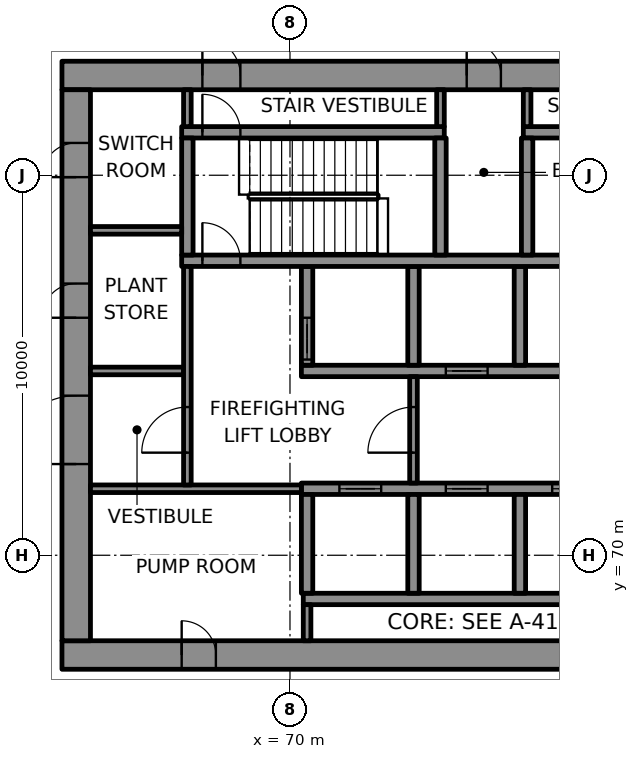
"""IFC4 building model, lengths in metres.
Left out: names, types, materials, properties, quantities, classifications, styles, units other than length and angle.
Written with IfcOpenShell. Run it as: python <this file> out.ifc"""

import sys

from ifc_helpers import new_model, si_unit, direction, frame, frame_2d, origin, place, context, subcontext, project, spatial, rectangle, extrude, element, fill, save


model = new_model("IFC4")
c1 = context("Model", 3, precision=1e-05, world=origin(), true_north=direction((0.0, 1.0)))
c2 = subcontext(c1, "Body", "Model", "MODEL_VIEW")
j1 = project(units=[si_unit("LENGTHUNIT", "METRE"), si_unit("PLANEANGLEUNIT", "RADIAN")], contexts=[c1])
p1 = place(None, origin())
s1 = spatial("IfcSite", under=j1, at=p1, CompositionType="ELEMENT")
p2 = place(p1, origin())
s2 = spatial("IfcBuilding", under=s1, at=p2, CompositionType="ELEMENT")
p3 = place(p2, frame((0.0, 0.0, 151.3)))
s3 = spatial("IfcBuildingStorey", under=s2, at=p3, CompositionType="ELEMENT", Elevation=151.3)
p4 = place(p3, frame((64.0, 67.375, 0.0), z_axis=(0.0, 0.0, 1.0), x_axis=(1.0, 0.0, 0.0)))
e1 = element("IfcWall", 1, at=p4, inside=s3, PredefinedType="SHEAR", context=c2, shape_type="SweptSolid", body=[
    extrude(rectangle(XDim=22.0, YDim=0.75, at=frame_2d((11.0, 0.0))), origin(), (0.0, 0.0, 1.0), 4.3),
])
p5 = place(p4, frame((3.15, 0.0, 0.0)))
e2 = element("IfcOpeningElement", 2, at=p5, cuts=e1, PredefinedType="OPENING", context=c2, shape_type="SweptSolid", body=[
    extrude(rectangle(XDim=0.9, YDim=2.1, at=frame_2d((0.45, 1.05))), frame((0.0, 0.385, 0.0), z_axis=(0.0, -1.0, 0.0), x_axis=(1.0, 0.0, 0.0)), (0.0, 0.0, 1.0), 0.77),
])
p6 = place(p3, frame((64.0, 82.625, 0.0), z_axis=(0.0, 0.0, 1.0), x_axis=(1.0, 0.0, 0.0)))
e3 = element("IfcWall", 3, at=p6, inside=s3, PredefinedType="SHEAR", context=c2, shape_type="SweptSolid", body=[
    extrude(rectangle(XDim=22.0, YDim=0.75, at=frame_2d((11.0, 0.0))), origin(), (0.0, 0.0, 1.0), 4.3),
])
p7 = place(p6, frame((3.695, 0.0, 0.0)))
e4 = element("IfcOpeningElement", 4, at=p7, cuts=e3, PredefinedType="OPENING", context=c2, shape_type="SweptSolid", body=[
    extrude(rectangle(XDim=1.0, YDim=2.1, at=frame_2d((0.5, 1.05))), frame((0.0, 0.385, 0.0), z_axis=(0.0, -1.0, 0.0), x_axis=(1.0, 0.0, 0.0)), (0.0, 0.0, 1.0), 0.77),
])
p8 = place(p6, frame((17.505, 0.0, 0.0)))
e5 = element("IfcOpeningElement", 5, at=p8, cuts=e3, PredefinedType="OPENING", context=c2, shape_type="SweptSolid", body=[
    extrude(rectangle(XDim=1.0, YDim=2.1, at=frame_2d((0.5, 1.05))), frame((0.0, 0.385, 0.0), z_axis=(0.0, -1.0, 0.0), x_axis=(1.0, 0.0, 0.0)), (0.0, 0.0, 1.0), 0.77),
])
p9 = place(p6, frame((10.65, 0.0, 0.0)))
e6 = element("IfcOpeningElement", 6, at=p9, cuts=e3, PredefinedType="OPENING", context=c2, shape_type="SweptSolid", body=[
    extrude(rectangle(XDim=0.9, YDim=2.1, at=frame_2d((0.45, 1.05))), frame((0.0, 0.385, 0.0), z_axis=(0.0, -1.0, 0.0), x_axis=(1.0, 0.0, 0.0)), (0.0, 0.0, 1.0), 0.77),
])
p10 = place(p3, frame((64.375, 67.75, 0.0), z_axis=(0.0, 0.0, 1.0), x_axis=(0.0, 1.0, 0.0)))
e7 = element("IfcWall", 7, at=p10, inside=s3, PredefinedType="SHEAR", context=c2, shape_type="SweptSolid", body=[
    extrude(rectangle(XDim=14.5, YDim=0.75, at=frame_2d((7.25, 0.0))), origin(), (0.0, 0.0, 1.0), 4.3),
])
p11 = place(p10, frame((4.65, 0.0, 0.0)))
e8 = element("IfcOpeningElement", 8, at=p11, cuts=e7, PredefinedType="OPENING", context=c2, shape_type="SweptSolid", body=[
    extrude(rectangle(XDim=1.8, YDim=2.1, at=frame_2d((0.9, 1.05))), frame((0.0, 0.385, 0.0), z_axis=(0.0, -1.0, 0.0), x_axis=(1.0, 0.0, 0.0)), (0.0, 0.0, 1.0), 0.77),
])
p12 = place(p10, frame((8.5, 0.0, 0.0)))
e9 = element("IfcOpeningElement", 9, at=p12, cuts=e7, PredefinedType="OPENING", context=c2, shape_type="SweptSolid", body=[
    extrude(rectangle(XDim=0.9, YDim=2.1, at=frame_2d((0.45, 1.05))), frame((0.0, 0.385, 0.0), z_axis=(0.0, -1.0, 0.0), x_axis=(1.0, 0.0, 0.0)), (0.0, 0.0, 1.0), 0.77),
])
p13 = place(p10, frame((12.2, 0.0, 0.0)))
e10 = element("IfcOpeningElement", 10, at=p13, cuts=e7, PredefinedType="OPENING", context=c2, shape_type="SweptSolid", body=[
    extrude(rectangle(XDim=0.9, YDim=2.1, at=frame_2d((0.45, 1.05))), frame((0.0, 0.385, 0.0), z_axis=(0.0, -1.0, 0.0), x_axis=(1.0, 0.0, 0.0)), (0.0, 0.0, 1.0), 0.77),
])
p14 = place(p3, frame((70.35, 68.85, 0.0), z_axis=(0.0, 0.0, 1.0), x_axis=(1.0, 0.0, 0.0)))
e11 = element("IfcWall", 11, at=p14, inside=s3, PredefinedType="SHEAR", context=c2, shape_type="SweptSolid", body=[
    extrude(rectangle(XDim=14.2, YDim=0.3, at=frame_2d((7.1, 0.0))), origin(), (0.0, 0.0, 1.0), 4.3),
])
p15 = place(p3, frame((70.3, 71.75, 0.0), z_axis=(0.0, 0.0, 1.0), x_axis=(1.0, 0.0, 0.0)))
e12 = element("IfcWall", 12, at=p15, inside=s3, PredefinedType="SHEAR", context=c2, shape_type="SweptSolid", body=[
    extrude(rectangle(XDim=14.3, YDim=0.3, at=frame_2d((7.15, 0.0))), origin(), (0.0, 0.0, 1.0), 4.3),
])
p16 = place(p15, frame((1.0, 0.0, 0.0)))
e13 = element("IfcOpeningElement", 13, at=p16, cuts=e12, PredefinedType="OPENING", context=c2, shape_type="SweptSolid", body=[
    extrude(rectangle(XDim=1.1, YDim=2.1, at=frame_2d((0.55, 1.05))), frame((0.0, 0.16, 0.0), z_axis=(0.0, -1.0, 0.0), x_axis=(1.0, 0.0, 0.0)), (0.0, 0.0, 1.0), 0.32),
])
p17 = place(p15, frame((3.8, 0.0, 0.0)))
e14 = element("IfcOpeningElement", 14, at=p17, cuts=e12, PredefinedType="OPENING", context=c2, shape_type="SweptSolid", body=[
    extrude(rectangle(XDim=1.1, YDim=2.1, at=frame_2d((0.55, 1.05))), frame((0.0, 0.16, 0.0), z_axis=(0.0, -1.0, 0.0), x_axis=(1.0, 0.0, 0.0)), (0.0, 0.0, 1.0), 0.32),
])
p18 = place(p15, frame((6.6, 0.0, 0.0)))
e15 = element("IfcOpeningElement", 15, at=p18, cuts=e12, PredefinedType="OPENING", context=c2, shape_type="SweptSolid", body=[
    extrude(rectangle(XDim=1.1, YDim=2.1, at=frame_2d((0.55, 1.05))), frame((0.0, 0.16, 0.0), z_axis=(0.0, -1.0, 0.0), x_axis=(1.0, 0.0, 0.0)), (0.0, 0.0, 1.0), 0.32),
])
p19 = place(p15, frame((9.4, 0.0, 0.0)))
e16 = element("IfcOpeningElement", 16, at=p19, cuts=e12, PredefinedType="OPENING", context=c2, shape_type="SweptSolid", body=[
    extrude(rectangle(XDim=1.1, YDim=2.1, at=frame_2d((0.55, 1.05))), frame((0.0, 0.16, 0.0), z_axis=(0.0, -1.0, 0.0), x_axis=(1.0, 0.0, 0.0)), (0.0, 0.0, 1.0), 0.32),
])
p20 = place(p15, frame((12.2, 0.0, 0.0)))
e17 = element("IfcOpeningElement", 17, at=p20, cuts=e12, PredefinedType="OPENING", context=c2, shape_type="SweptSolid", body=[
    extrude(rectangle(XDim=1.1, YDim=2.1, at=frame_2d((0.55, 1.05))), frame((0.0, 0.16, 0.0), z_axis=(0.0, -1.0, 0.0), x_axis=(1.0, 0.0, 0.0)), (0.0, 0.0, 1.0), 0.32),
])
p21 = place(p3, frame((70.3, 74.85, 0.0), z_axis=(0.0, 0.0, 1.0), x_axis=(1.0, 0.0, 0.0)))
e18 = element("IfcWall", 18, at=p21, inside=s3, PredefinedType="SHEAR", context=c2, shape_type="SweptSolid", body=[
    extrude(rectangle(XDim=14.3, YDim=0.3, at=frame_2d((7.15, 0.0))), origin(), (0.0, 0.0, 1.0), 4.3),
])
p22 = place(p21, frame((3.8, 0.0, 0.0)))
e19 = element("IfcOpeningElement", 19, at=p22, cuts=e18, PredefinedType="OPENING", context=c2, shape_type="SweptSolid", body=[
    extrude(rectangle(XDim=1.1, YDim=2.1, at=frame_2d((0.55, 1.05))), frame((0.0, 0.16, 0.0), z_axis=(0.0, -1.0, 0.0), x_axis=(1.0, 0.0, 0.0)), (0.0, 0.0, 1.0), 0.32),
])
p23 = place(p21, frame((12.2, 0.0, 0.0)))
e20 = element("IfcOpeningElement", 20, at=p23, cuts=e18, PredefinedType="OPENING", context=c2, shape_type="SweptSolid", body=[
    extrude(rectangle(XDim=1.1, YDim=2.1, at=frame_2d((0.55, 1.05))), frame((0.0, 0.16, 0.0), z_axis=(0.0, -1.0, 0.0), x_axis=(1.0, 0.0, 0.0)), (0.0, 0.0, 1.0), 0.32),
])
p24 = place(p3, frame((70.45, 69.0, 0.0), z_axis=(0.0, 0.0, 1.0), x_axis=(0.0, 1.0, 0.0)))
e21 = element("IfcWall", 21, at=p24, inside=s3, PredefinedType="SHEAR", context=c2, shape_type="SweptSolid", body=[
    extrude(rectangle(XDim=2.6, YDim=0.3, at=frame_2d((1.3, 0.0))), origin(), (0.0, 0.0, 1.0), 4.3),
])
p25 = place(p3, frame((70.45, 75.0, 0.0), z_axis=(0.0, 0.0, 1.0), x_axis=(0.0, 1.0, 0.0)))
e22 = element("IfcWall", 22, at=p25, inside=s3, PredefinedType="SHEAR", context=c2, shape_type="SweptSolid", body=[
    extrude(rectangle(XDim=2.6, YDim=0.3, at=frame_2d((1.3, 0.0))), origin(), (0.0, 0.0, 1.0), 4.3),
])
p26 = place(p25, frame((0.15, 0.0, 0.0)))
e23 = element("IfcOpeningElement", 23, at=p26, cuts=e22, PredefinedType="OPENING", context=c2, shape_type="SweptSolid", body=[
    extrude(rectangle(XDim=1.1, YDim=2.1, at=frame_2d((0.55, 1.05))), frame((0.0, 0.16, 0.0), z_axis=(0.0, -1.0, 0.0), x_axis=(1.0, 0.0, 0.0)), (0.0, 0.0, 1.0), 0.32),
])
for number, where, z_axis, x_axis in (
    (24, (73.25, 69.0, 0.0), (0.0, 0.0, 1.0), (0.0, 1.0, 0.0)),
    (25, (73.25, 75.0, 0.0), (0.0, 0.0, 1.0), (0.0, 1.0, 0.0)),
    (26, (76.05, 69.0, 0.0), (0.0, 0.0, 1.0), (0.0, 1.0, 0.0)),
    (27, (76.05, 75.0, 0.0), (0.0, 0.0, 1.0), (0.0, 1.0, 0.0)),
):
    element("IfcWall", number, at=place(p3, frame(where, z_axis=z_axis, x_axis=x_axis)), inside=s3, PredefinedType="SHEAR", context=c2, shape_type="SweptSolid", body=[
        extrude(rectangle(XDim=2.6, YDim=0.3, at=frame_2d((1.3, 0.0))), origin(), (0.0, 0.0, 1.0), 4.3),
    ])
p27 = place(p3, frame((67.15, 77.75, 0.0), z_axis=(0.0, 0.0, 1.0), x_axis=(1.0, 0.0, 0.0)))
e28 = element("IfcWall", 28, at=p27, inside=s3, PredefinedType="SHEAR", context=c2, shape_type="SweptSolid", body=[
    extrude(rectangle(XDim=17.45, YDim=0.3, at=frame_2d((8.725, 0.0))), origin(), (0.0, 0.0, 1.0), 4.3),
])
p28 = place(p27, frame((0.545, 0.0, 0.0)))
e29 = element("IfcOpeningElement", 29, at=p28, cuts=e28, PredefinedType="OPENING", context=c2, shape_type="SweptSolid", body=[
    extrude(rectangle(XDim=1.0, YDim=2.1, at=frame_2d((0.5, 1.05))), frame((0.0, 0.16, 0.0), z_axis=(0.0, -1.0, 0.0), x_axis=(1.0, 0.0, 0.0)), (0.0, 0.0, 1.0), 0.32),
])
p29 = place(p3, frame((67.15, 81.13, 0.0), z_axis=(0.0, 0.0, 1.0), x_axis=(1.0, 0.0, 0.0)))
e30 = element("IfcWall", 30, at=p29, inside=s3, PredefinedType="SHEAR", context=c2, shape_type="SweptSolid", body=[
    extrude(rectangle(XDim=6.91, YDim=0.3, at=frame_2d((3.455, 0.0))), origin(), (0.0, 0.0, 1.0), 4.3),
])
p30 = place(p29, frame((0.545, 0.0, 0.0)))
e31 = element("IfcOpeningElement", 31, at=p30, cuts=e30, PredefinedType="OPENING", context=c2, shape_type="SweptSolid", body=[
    extrude(rectangle(XDim=1.0, YDim=2.1, at=frame_2d((0.5, 1.05))), frame((0.0, 0.16, 0.0), z_axis=(0.0, -1.0, 0.0), x_axis=(1.0, 0.0, 0.0)), (0.0, 0.0, 1.0), 0.32),
])
p31 = place(p3, frame((76.14, 81.13, 0.0), z_axis=(0.0, 0.0, 1.0), x_axis=(1.0, 0.0, 0.0)))
e32 = element("IfcWall", 32, at=p31, inside=s3, PredefinedType="SHEAR", context=c2, shape_type="SweptSolid", body=[
    extrude(rectangle(XDim=6.86, YDim=0.3, at=frame_2d((3.43, 0.0))), origin(), (0.0, 0.0, 1.0), 4.3),
])
p32 = place(p31, frame((5.365, 0.0, 0.0)))
e33 = element("IfcOpeningElement", 33, at=p32, cuts=e32, PredefinedType="OPENING", context=c2, shape_type="SweptSolid", body=[
    extrude(rectangle(XDim=1.0, YDim=2.1, at=frame_2d((0.5, 1.05))), frame((0.0, 0.16, 0.0), z_axis=(0.0, -1.0, 0.0), x_axis=(1.0, 0.0, 0.0)), (0.0, 0.0, 1.0), 0.32),
])
for number, where, z_axis, x_axis in (
    (34, (67.3, 77.9, 0.0), (0.0, 0.0, 1.0), (0.0, 1.0, 0.0)),
    (35, (73.96, 77.9, 0.0), (0.0, 0.0, 1.0), (0.0, 1.0, 0.0)),
    (36, (76.24, 77.9, 0.0), (0.0, 0.0, 1.0), (0.0, 1.0, 0.0)),
):
    element("IfcWall", number, at=place(p3, frame(where, z_axis=z_axis, x_axis=x_axis)), inside=s3, PredefinedType="SHEAR", context=c2, shape_type="SweptSolid", body=[
        extrude(rectangle(XDim=3.08, YDim=0.3, at=frame_2d((1.54, 0.0))), origin(), (0.0, 0.0, 1.0), 4.3),
    ])
p33 = place(p3, frame((71.348, 108.836, 0.0), z_axis=(0.0, 0.0, 1.0), x_axis=(-0.500000750612, -0.866024970418, 0.0)))
e37 = element("IfcWall", 37, at=p33, inside=s3, PredefinedType="SOLIDWALL", context=c2, shape_type="SweptSolid", body=[
    extrude(rectangle(XDim=54.954, YDim=0.3, at=frame_2d((27.477, 0.0))), origin(), (0.0, 0.0, 1.0), 4.3),
])
p34 = place(p33, frame((2.96, 0.0, 0.8)))
e38 = element("IfcOpeningElement", 38, at=p34, cuts=e37, PredefinedType="OPENING", context=c2, shape_type="SweptSolid", body=[
    extrude(rectangle(XDim=3.0, YDim=2.4, at=frame_2d((1.5, 1.2))), frame((0.0, 0.16, 0.0), z_axis=(0.0, -1.0, 0.0), x_axis=(1.0, 0.0, 0.0)), (0.0, 0.0, 1.0), 0.32),
])
p35 = place(p33, frame((48.994, 0.0, 0.8)))
e39 = element("IfcOpeningElement", 39, at=p35, cuts=e37, PredefinedType="OPENING", context=c2, shape_type="SweptSolid", body=[
    extrude(rectangle(XDim=3.0, YDim=2.4, at=frame_2d((1.5, 1.2))), frame((0.0, 0.16, 0.0), z_axis=(0.0, -1.0, 0.0), x_axis=(1.0, 0.0, 0.0)), (0.0, 0.0, 1.0), 0.32),
])
p36 = place(p3, frame((64.75, 71.75, 0.0), z_axis=(0.0, 0.0, 1.0), x_axis=(1.0, 0.0, 0.0)))
e40 = element("IfcWall", 40, at=p36, inside=s3, PredefinedType="PARTITIONING", context=c2, shape_type="SweptSolid", body=[
    extrude(rectangle(XDim=5.55, YDim=0.2, at=frame_2d((2.775, 0.0))), origin(), (0.0, 0.0, 1.0), 4.3),
])
p37 = place(p3, frame((64.75, 74.85, 0.0), z_axis=(0.0, 0.0, 1.0), x_axis=(1.0, 0.0, 0.0)))
e41 = element("IfcWall", 41, at=p37, inside=s3, PredefinedType="PARTITIONING", context=c2, shape_type="SweptSolid", body=[
    extrude(rectangle(XDim=2.45, YDim=0.2, at=frame_2d((1.225, 0.0))), origin(), (0.0, 0.0, 1.0), 4.3),
])
p38 = place(p3, frame((64.75, 78.55, 0.0), z_axis=(0.0, 0.0, 1.0), x_axis=(1.0, 0.0, 0.0)))
e42 = element("IfcWall", 42, at=p38, inside=s3, PredefinedType="PARTITIONING", context=c2, shape_type="SweptSolid", body=[
    extrude(rectangle(XDim=2.4, YDim=0.2, at=frame_2d((1.2, 0.0))), origin(), (0.0, 0.0, 1.0), 4.3),
])
p39 = place(p3, frame((67.3, 71.85, 0.0), z_axis=(0.0, 0.0, 1.0), x_axis=(0.0, 1.0, 0.0)))
e43 = element("IfcWall", 43, at=p39, inside=s3, PredefinedType="PARTITIONING", context=c2, shape_type="SweptSolid", body=[
    extrude(rectangle(XDim=5.75, YDim=0.2, at=frame_2d((2.875, 0.0))), origin(), (0.0, 0.0, 1.0), 4.3),
])
p40 = place(p39, frame((0.85, 0.0, 0.0)))
e44 = element("IfcOpeningElement", 44, at=p40, cuts=e43, PredefinedType="OPENING", context=c2, shape_type="SweptSolid", body=[
    extrude(rectangle(XDim=1.2, YDim=2.1, at=frame_2d((0.6, 1.05))), frame((0.0, 0.11, 0.0), z_axis=(0.0, -1.0, 0.0), x_axis=(1.0, 0.0, 0.0)), (0.0, 0.0, 1.0), 0.22),
])
p41 = place(p3, frame((67.3, 81.28, 0.0), z_axis=(0.0, 0.0, 1.0), x_axis=(0.0, 1.0, 0.0)))
e45 = element("IfcWall", 45, at=p41, inside=s3, PredefinedType="PARTITIONING", context=c2, shape_type="SweptSolid", body=[
    extrude(rectangle(XDim=0.97, YDim=0.2, at=frame_2d((0.485, 0.0))), origin(), (0.0, 0.0, 1.0), 4.3),
])
p42 = place(p3, frame((70.45, 67.75, 0.0), z_axis=(0.0, 0.0, 1.0), x_axis=(0.0, 1.0, 0.0)))
e46 = element("IfcWall", 46, at=p42, inside=s3, PredefinedType="PARTITIONING", context=c2, shape_type="SweptSolid", body=[
    extrude(rectangle(XDim=0.95, YDim=0.2, at=frame_2d((0.475, 0.0))), origin(), (0.0, 0.0, 1.0), 4.3),
])
p43 = place(p3, frame((73.25, 71.9, 0.0), z_axis=(0.0, 0.0, 1.0), x_axis=(0.0, 1.0, 0.0)))
e47 = element("IfcWall", 47, at=p43, inside=s3, PredefinedType="PARTITIONING", context=c2, shape_type="SweptSolid", body=[
    extrude(rectangle(XDim=2.8, YDim=0.2, at=frame_2d((1.4, 0.0))), origin(), (0.0, 0.0, 1.0), 4.3),
])
p44 = place(p43, frame((0.8, 0.0, 0.0)))
e48 = element("IfcOpeningElement", 48, at=p44, cuts=e47, PredefinedType="OPENING", context=c2, shape_type="SweptSolid", body=[
    extrude(rectangle(XDim=1.2, YDim=2.1, at=frame_2d((0.6, 1.05))), frame((0.0, 0.11, 0.0), z_axis=(0.0, -1.0, 0.0), x_axis=(1.0, 0.0, 0.0)), (0.0, 0.0, 1.0), 0.22),
])
for number, where, z_axis, x_axis in (
    (49, (73.96, 81.28, 0.0), (0.0, 0.0, 1.0), (0.0, 1.0, 0.0)),
    (50, (76.24, 81.28, 0.0), (0.0, 0.0, 1.0), (0.0, 1.0, 0.0)),
):
    element("IfcWall", number, at=place(p3, frame(where, z_axis=z_axis, x_axis=x_axis)), inside=s3, PredefinedType="PARTITIONING", context=c2, shape_type="SweptSolid", body=[
        extrude(rectangle(XDim=0.97, YDim=0.2, at=frame_2d((0.485, 0.0))), origin(), (0.0, 0.0, 1.0), 4.3),
    ])
p45 = place(p16, origin())
e51 = element("IfcDoor", 51, at=p45, inside=s3, OperationType="DOUBLE_DOOR_SLIDING", PredefinedType="DOOR", context=c2, shape_type="SweptSolid", body=[
    extrude(rectangle(XDim=1.1, YDim=2.1, at=frame_2d((0.55, 1.05))), frame((0.0, 0.025, 0.0), z_axis=(0.0, -1.0, 0.0), x_axis=(1.0, 0.0, 0.0)), (0.0, 0.0, 1.0), 0.05),
])
fill(e13, e51)
p46 = place(p17, origin())
e52 = element("IfcDoor", 52, at=p46, inside=s3, OperationType="DOUBLE_DOOR_SLIDING", PredefinedType="DOOR", context=c2, shape_type="SweptSolid", body=[
    extrude(rectangle(XDim=1.1, YDim=2.1, at=frame_2d((0.55, 1.05))), frame((0.0, 0.025, 0.0), z_axis=(0.0, -1.0, 0.0), x_axis=(1.0, 0.0, 0.0)), (0.0, 0.0, 1.0), 0.05),
])
fill(e14, e52)
p47 = place(p18, origin())
e53 = element("IfcDoor", 53, at=p47, inside=s3, OperationType="DOUBLE_DOOR_SLIDING", PredefinedType="DOOR", context=c2, shape_type="SweptSolid", body=[
    extrude(rectangle(XDim=1.1, YDim=2.1, at=frame_2d((0.55, 1.05))), frame((0.0, 0.025, 0.0), z_axis=(0.0, -1.0, 0.0), x_axis=(1.0, 0.0, 0.0)), (0.0, 0.0, 1.0), 0.05),
])
fill(e15, e53)
p48 = place(p26, origin())
e54 = element("IfcDoor", 54, at=p48, inside=s3, OperationType="DOUBLE_DOOR_SLIDING", PredefinedType="DOOR", context=c2, shape_type="SweptSolid", body=[
    extrude(rectangle(XDim=1.1, YDim=2.1, at=frame_2d((0.55, 1.05))), frame((0.0, 0.025, 0.0), z_axis=(0.0, -1.0, 0.0), x_axis=(1.0, 0.0, 0.0)), (0.0, 0.0, 1.0), 0.05),
])
fill(e23, e54)
p49 = place(p22, origin())
e55 = element("IfcDoor", 55, at=p49, inside=s3, OperationType="DOUBLE_DOOR_SLIDING", PredefinedType="DOOR", context=c2, shape_type="SweptSolid", body=[
    extrude(rectangle(XDim=1.1, YDim=2.1, at=frame_2d((0.55, 1.05))), frame((0.0, 0.025, 0.0), z_axis=(0.0, -1.0, 0.0), x_axis=(1.0, 0.0, 0.0)), (0.0, 0.0, 1.0), 0.05),
])
fill(e19, e55)
p50 = place(p28, origin())
e56 = element("IfcDoor", 56, at=p50, inside=s3, OperationType="SINGLE_SWING_LEFT", PredefinedType="DOOR", context=c2, shape_type="SweptSolid", body=[
    extrude(rectangle(XDim=1.0, YDim=2.1, at=frame_2d((0.5, 1.05))), frame((0.0, 0.025, 0.0), z_axis=(0.0, -1.0, 0.0), x_axis=(1.0, 0.0, 0.0)), (0.0, 0.0, 1.0), 0.05),
])
fill(e29, e56)
p51 = place(p30, origin())
e57 = element("IfcDoor", 57, at=p51, inside=s3, OperationType="SINGLE_SWING_RIGHT", PredefinedType="DOOR", context=c2, shape_type="SweptSolid", body=[
    extrude(rectangle(XDim=1.0, YDim=2.1, at=frame_2d((0.5, 1.05))), frame((0.0, 0.025, 0.0), z_axis=(0.0, -1.0, 0.0), x_axis=(1.0, 0.0, 0.0)), (0.0, 0.0, 1.0), 0.05),
])
fill(e31, e57)
p52 = place(p7, origin())
e58 = element("IfcDoor", 58, at=p52, inside=s3, OperationType="SINGLE_SWING_LEFT", PredefinedType="DOOR", context=c2, shape_type="SweptSolid", body=[
    extrude(rectangle(XDim=1.0, YDim=2.1, at=frame_2d((0.5, 1.05))), frame((0.0, 0.095, 0.0), z_axis=(0.0, -1.0, 0.0), x_axis=(1.0, 0.0, 0.0)), (0.0, 0.0, 1.0), 0.19),
])
fill(e4, e58)
p53 = place(p44, origin())
e59 = element("IfcDoor", 59, at=p53, inside=s3, OperationType="SINGLE_SWING_LEFT", PredefinedType="DOOR", context=c2, shape_type="SweptSolid", body=[
    extrude(rectangle(XDim=1.2, YDim=2.1, at=frame_2d((0.6, 1.05))), frame((0.0, 0.025, 0.0), z_axis=(0.0, -1.0, 0.0), x_axis=(1.0, 0.0, 0.0)), (0.0, 0.0, 1.0), 0.05),
])
fill(e48, e59)
p54 = place(p40, origin())
e60 = element("IfcDoor", 60, at=p54, inside=s3, OperationType="SINGLE_SWING_RIGHT", PredefinedType="DOOR", context=c2, shape_type="SweptSolid", body=[
    extrude(rectangle(XDim=1.2, YDim=2.1, at=frame_2d((0.6, 1.05))), frame((0.0, 0.025, 0.0), z_axis=(0.0, -1.0, 0.0), x_axis=(1.0, 0.0, 0.0)), (0.0, 0.0, 1.0), 0.05),
])
fill(e44, e60)
p55 = place(p11, origin())
e61 = element("IfcDoor", 61, at=p55, inside=s3, OperationType="SINGLE_SWING_LEFT", PredefinedType="DOOR", context=c2, shape_type="SweptSolid", body=[
    extrude(rectangle(XDim=1.8, YDim=2.1, at=frame_2d((0.9, 1.05))), frame((0.0, 0.095, 0.0), z_axis=(0.0, -1.0, 0.0), x_axis=(1.0, 0.0, 0.0)), (0.0, 0.0, 1.0), 0.19),
])
fill(e8, e61)
p56 = place(p5, origin())
e62 = element("IfcDoor", 62, at=p56, inside=s3, OperationType="SINGLE_SWING_LEFT", PredefinedType="DOOR", context=c2, shape_type="SweptSolid", body=[
    extrude(rectangle(XDim=0.9, YDim=2.1, at=frame_2d((0.45, 1.05))), frame((0.0, 0.095, 0.0), z_axis=(0.0, -1.0, 0.0), x_axis=(1.0, 0.0, 0.0)), (0.0, 0.0, 1.0), 0.19),
])
fill(e2, e62)
p57 = place(p12, origin())
e63 = element("IfcDoor", 63, at=p57, inside=s3, OperationType="SINGLE_SWING_RIGHT", PredefinedType="DOOR", context=c2, shape_type="SweptSolid", body=[
    extrude(rectangle(XDim=0.9, YDim=2.1, at=frame_2d((0.45, 1.05))), frame((0.0, 0.095, 0.0), z_axis=(0.0, -1.0, 0.0), x_axis=(1.0, 0.0, 0.0)), (0.0, 0.0, 1.0), 0.19),
])
fill(e9, e63)
p58 = place(p13, origin())
e64 = element("IfcDoor", 64, at=p58, inside=s3, OperationType="SINGLE_SWING_LEFT", PredefinedType="DOOR", context=c2, shape_type="SweptSolid", body=[
    extrude(rectangle(XDim=0.9, YDim=2.1, at=frame_2d((0.45, 1.05))), frame((0.0, 0.095, 0.0), z_axis=(0.0, -1.0, 0.0), x_axis=(1.0, 0.0, 0.0)), (0.0, 0.0, 1.0), 0.19),
])
fill(e10, e64)
p59 = place(p9, origin())
e65 = element("IfcDoor", 65, at=p59, inside=s3, OperationType="SINGLE_SWING_RIGHT", PredefinedType="DOOR", context=c2, shape_type="SweptSolid", body=[
    extrude(rectangle(XDim=0.9, YDim=2.1, at=frame_2d((0.45, 1.05))), frame((0.0, 0.095, 0.0), z_axis=(0.0, -1.0, 0.0), x_axis=(1.0, 0.0, 0.0)), (0.0, 0.0, 1.0), 0.19),
])
fill(e6, e65)
save(model, sys.argv[1])
